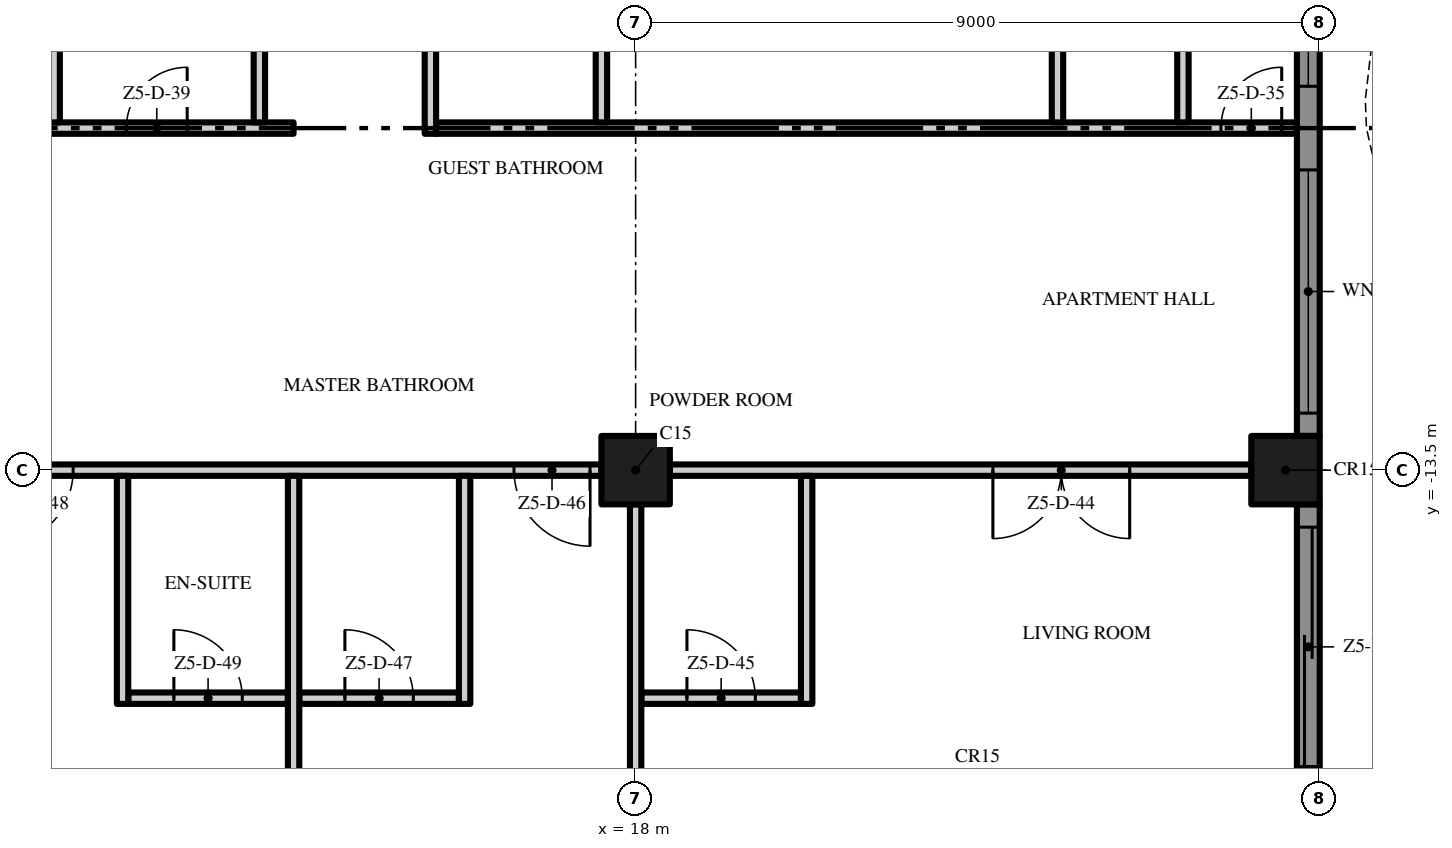
"""IFC4 building model, lengths in metres.
Left out: names, types, materials, properties, quantities, classifications, styles, units other than length and angle.
Written with IfcOpenShell. Run it as: python <this file> out.ifc"""

import sys

from ifc_helpers import new_model, si_unit, direction, frame, frame_2d, origin, origin_2d, place, context, subcontext, project, spatial, polyline, rectangle, outline, extrude, element, fill, save


model = new_model("IFC4")
c1 = context("Model", 3, precision=1e-05, world=origin(), true_north=direction((0.0, 1.0)))
c2 = subcontext(c1, "Body", "Model", "MODEL_VIEW")
j1 = project(units=[si_unit("LENGTHUNIT", "METRE"), si_unit("PLANEANGLEUNIT", "RADIAN")], contexts=[c1])
p1 = place(None, origin())
s1 = spatial("IfcSite", under=j1, at=p1, CompositionType="ELEMENT")
p2 = place(p1, origin())
s2 = spatial("IfcBuilding", under=s1, at=p2, CompositionType="ELEMENT")
p3 = place(p2, frame((0.0, 0.0, 276.8)))
s3 = spatial("IfcBuildingStorey", under=s2, at=p3, CompositionType="ELEMENT", Elevation=276.8)
for number, where, z_axis, x_axis in (
    (1, (18.0, -13.5, 0.0), (0.0, 0.0, 1.0), (1.0, 0.0, 0.0)),
    (2, (26.55, -13.5, 0.0), (0.0, 0.0, 1.0), (1.0, 0.0, 0.0)),
):
    element("IfcColumn", number, at=place(p3, frame(where, z_axis=z_axis, x_axis=x_axis)), inside=s3, PredefinedType="COLUMN", context=c2, shape_type="SweptSolid", body=[
        extrude(rectangle(XDim=0.9, YDim=0.9, at=origin_2d()), origin(), (0.0, 0.0, 1.0), 3.5),
    ])
p4 = place(p3, frame((26.85, -13.95, 0.0), z_axis=(0.0, 0.0, 1.0), x_axis=(0.0, -1.0, 0.0)))
e3 = element("IfcWall", 3, at=p4, inside=s3, PredefinedType="SOLIDWALL", context=c2, shape_type="SweptSolid", body=[
    extrude(rectangle(XDim=3.75, YDim=0.3, at=frame_2d((1.875, 0.0))), origin(), (0.0, 0.0, 1.0), 3.5),
])
p5 = place(p4, frame((0.3, 0.0, 0.0)))
e4 = element("IfcOpeningElement", 4, at=p5, cuts=e3, PredefinedType="OPENING", context=c2, shape_type="SweptSolid", body=[
    extrude(rectangle(XDim=3.15, YDim=2.4, at=frame_2d((1.575, 1.2))), frame((0.0, 0.16, 0.0), z_axis=(0.0, -1.0, 0.0), x_axis=(1.0, 0.0, 0.0)), (0.0, 0.0, 1.0), 0.32),
])
p6 = place(p3, frame((26.85, -4.95, 0.0), z_axis=(0.0, 0.0, 1.0), x_axis=(0.0, -1.0, 0.0)))
e5 = element("IfcWall", 5, at=p6, inside=s3, PredefinedType="SOLIDWALL", context=c2, shape_type="SweptSolid", body=[
    extrude(rectangle(XDim=8.1, YDim=0.3, at=frame_2d((4.05, 0.0))), origin(), (0.0, 0.0, 1.0), 3.5),
])
p7 = place(p6, frame((4.6, 0.0, 0.45)))
e6 = element("IfcOpeningElement", 6, at=p7, cuts=e5, PredefinedType="OPENING", context=c2, shape_type="SweptSolid", body=[
    extrude(rectangle(XDim=3.2, YDim=2.65, at=frame_2d((1.6, 1.325))), frame((0.0, 0.16, 0.0), z_axis=(0.0, -1.0, 0.0), x_axis=(1.0, 0.0, 0.0)), (0.0, 0.0, 1.0), 0.32),
])
p8 = place(p6, frame((0.3, 0.0, 0.45)))
e7 = element("IfcOpeningElement", 7, at=p8, cuts=e5, PredefinedType="OPENING", context=c2, shape_type="SweptSolid", body=[
    extrude(rectangle(XDim=3.2, YDim=2.65, at=frame_2d((1.6, 1.325))), frame((0.0, 0.16, 0.0), z_axis=(0.0, -1.0, 0.0), x_axis=(1.0, 0.0, 0.0)), (0.0, 0.0, 1.0), 0.32),
])
p9 = place(p3, origin())
e8 = element("IfcWall", 8, at=p9, inside=s3, PredefinedType="USERDEFINED", context=c2, shape_type="SweptSolid", body=[
    extrude(outline(polyline([(29.649, -18.0), (29.985, -16.5), (30.0, -16.125), (29.869, -15.0), (29.345, -13.5), (28.612, -12.0), (27.951, -10.5), (27.615, -9.0), (27.6, -8.625), (27.731, -7.5), (28.255, -6.0), (28.988, -4.5), (29.649, -3.0), (29.985, -1.5), (30.0, -1.125), (29.869, 0.0), (29.345, 1.5), (28.612, 3.0), (27.951, 4.5), (27.615, 6.0), (27.6, 6.375), (27.731, 7.5), (28.255, 9.0), (28.988, 10.5), (29.649, 12.0), (29.985, 13.5), (30.0, 13.875), (29.869, 15.0), (29.345, 16.5), (28.612, 18.0), (28.388, 17.89), (29.114, 16.404), (29.624, 14.944), (29.749, 13.865), (29.736, 13.533), (29.41, 12.079), (28.761, 10.605), (28.024, 9.096), (27.486, 7.556), (27.349, 6.385), (27.366, 5.967), (27.713, 4.421), (28.385, 2.895), (29.114, 1.404), (29.624, -0.056), (29.749, -1.135), (29.736, -1.467), (29.41, -2.921), (28.761, -4.395), (28.024, -5.904), (27.486, -7.444), (27.349, -8.615), (27.366, -9.033), (27.713, -10.579), (28.385, -12.105), (29.114, -13.596), (29.624, -15.056), (29.749, -16.135), (29.736, -16.467), (29.405, -17.945), (29.649, -18.0)])), origin(), (0.0, 0.0, 1.0), 0.9),
])
p10 = place(p3, frame((11.325, -16.5, 0.0), z_axis=(0.0, 0.0, 1.0), x_axis=(1.0, 0.0, 0.0)))
e9 = element("IfcWall", 9, at=p10, inside=s3, PredefinedType="PARTITIONING", context=c2, shape_type="SweptSolid", body=[
    extrude(rectangle(XDim=2.1, YDim=0.15, at=frame_2d((1.05, 0.0))), origin(), (0.0, 0.0, 1.0), 3.5),
])
p11 = place(p10, frame((0.6, 0.0, 0.0)))
e10 = element("IfcOpeningElement", 10, at=p11, cuts=e9, PredefinedType="OPENING", context=c2, shape_type="SweptSolid", body=[
    extrude(rectangle(XDim=0.9, YDim=2.1, at=frame_2d((0.45, 1.05))), frame((0.0, 0.085, 0.0), z_axis=(0.0, -1.0, 0.0), x_axis=(1.0, 0.0, 0.0)), (0.0, 0.0, 1.0), 0.17),
])
p12 = place(p3, frame((13.575, -16.5, 0.0), z_axis=(0.0, 0.0, 1.0), x_axis=(1.0, 0.0, 0.0)))
e11 = element("IfcWall", 11, at=p12, inside=s3, PredefinedType="PARTITIONING", context=c2, shape_type="SweptSolid", body=[
    extrude(rectangle(XDim=2.1, YDim=0.15, at=frame_2d((1.05, 0.0))), origin(), (0.0, 0.0, 1.0), 3.5),
])
p13 = place(p12, frame((0.6, 0.0, 0.0)))
e12 = element("IfcOpeningElement", 12, at=p13, cuts=e11, PredefinedType="OPENING", context=c2, shape_type="SweptSolid", body=[
    extrude(rectangle(XDim=0.9, YDim=2.1, at=frame_2d((0.45, 1.05))), frame((0.0, 0.085, 0.0), z_axis=(0.0, -1.0, 0.0), x_axis=(1.0, 0.0, 0.0)), (0.0, 0.0, 1.0), 0.17),
])
p14 = place(p3, frame((18.075, -16.5, 0.0), z_axis=(0.0, 0.0, 1.0), x_axis=(1.0, 0.0, 0.0)))
e13 = element("IfcWall", 13, at=p14, inside=s3, PredefinedType="PARTITIONING", context=c2, shape_type="SweptSolid", body=[
    extrude(rectangle(XDim=2.1, YDim=0.15, at=frame_2d((1.05, 0.0))), origin(), (0.0, 0.0, 1.0), 3.5),
])
p15 = place(p14, frame((0.6, 0.0, 0.0)))
e14 = element("IfcOpeningElement", 14, at=p15, cuts=e13, PredefinedType="OPENING", context=c2, shape_type="SweptSolid", body=[
    extrude(rectangle(XDim=0.9, YDim=2.1, at=frame_2d((0.45, 1.05))), frame((0.0, 0.085, 0.0), z_axis=(0.0, -1.0, 0.0), x_axis=(1.0, 0.0, 0.0)), (0.0, 0.0, 1.0), 0.17),
])
p16 = place(p3, frame((17.55, -13.5, 0.0), z_axis=(0.0, 0.0, 1.0), x_axis=(-1.0, 0.0, 0.0)))
e15 = element("IfcWall", 15, at=p16, inside=s3, PredefinedType="PARTITIONING", context=c2, shape_type="SweptSolid", body=[
    extrude(rectangle(XDim=8.1, YDim=0.15, at=frame_2d((4.05, 0.0))), origin(), (0.0, 0.0, 1.0), 3.5),
])
p17 = place(p16, frame((0.15, 0.0, 0.0)))
e16 = element("IfcOpeningElement", 16, at=p17, cuts=e15, PredefinedType="OPENING", context=c2, shape_type="SweptSolid", body=[
    extrude(rectangle(XDim=1.0, YDim=2.4, at=frame_2d((0.5, 1.2))), frame((0.0, 0.085, 0.0), z_axis=(0.0, -1.0, 0.0), x_axis=(1.0, 0.0, 0.0)), (0.0, 0.0, 1.0), 0.17),
])
p18 = place(p16, frame((6.95, 0.0, 0.0)))
e17 = element("IfcOpeningElement", 17, at=p18, cuts=e15, PredefinedType="OPENING", context=c2, shape_type="SweptSolid", body=[
    extrude(rectangle(XDim=1.0, YDim=2.4, at=frame_2d((0.5, 1.2))), frame((0.0, 0.085, 0.0), z_axis=(0.0, -1.0, 0.0), x_axis=(1.0, 0.0, 0.0)), (0.0, 0.0, 1.0), 0.17),
])
p19 = place(p3, frame((26.1, -13.5, 0.0), z_axis=(0.0, 0.0, 1.0), x_axis=(-1.0, 0.0, 0.0)))
e18 = element("IfcWall", 18, at=p19, inside=s3, PredefinedType="PARTITIONING", context=c2, shape_type="SweptSolid", body=[
    extrude(rectangle(XDim=7.65, YDim=0.15, at=frame_2d((3.825, 0.0))), origin(), (0.0, 0.0, 1.0), 3.5),
])
p20 = place(p19, frame((1.6, 0.0, 0.0)))
e19 = element("IfcOpeningElement", 19, at=p20, cuts=e18, PredefinedType="OPENING", context=c2, shape_type="SweptSolid", body=[
    extrude(rectangle(XDim=1.8, YDim=2.4, at=frame_2d((0.9, 1.2))), frame((0.0, 0.085, 0.0), z_axis=(0.0, -1.0, 0.0), x_axis=(1.0, 0.0, 0.0)), (0.0, 0.0, 1.0), 0.17),
])
p21 = place(p3, frame((0.1, -9.0, 0.0), z_axis=(0.0, 0.0, 1.0), x_axis=(1.0, 0.0, 0.0)))
e20 = element("IfcWall", 20, at=p21, inside=s3, PredefinedType="PARTITIONING", context=c2, shape_type="SweptSolid", body=[
    extrude(rectangle(XDim=13.4, YDim=0.15, at=frame_2d((6.7, 0.0))), origin(), (0.0, 0.0, 1.0), 3.5),
])
p22 = place(p21, frame((11.2, 0.0, 0.0)))
e21 = element("IfcOpeningElement", 21, at=p22, cuts=e20, PredefinedType="OPENING", context=c2, shape_type="SweptSolid", body=[
    extrude(rectangle(XDim=0.8, YDim=2.0, at=frame_2d((0.4, 1.0))), frame((0.0, 0.085, 0.0), z_axis=(0.0, -1.0, 0.0), x_axis=(1.0, 0.0, 0.0)), (0.0, 0.0, 1.0), 0.17),
])
p23 = place(p21, frame((8.55, 0.0, 0.0)))
e22 = element("IfcOpeningElement", 22, at=p23, cuts=e20, PredefinedType="OPENING", context=c2, shape_type="SweptSolid", body=[
    extrude(rectangle(XDim=0.8, YDim=2.0, at=frame_2d((0.4, 1.0))), frame((0.0, 0.085, 0.0), z_axis=(0.0, -1.0, 0.0), x_axis=(1.0, 0.0, 0.0)), (0.0, 0.0, 1.0), 0.17),
])
p24 = place(p21, frame((5.8, 0.0, 0.0)))
e23 = element("IfcOpeningElement", 23, at=p24, cuts=e20, PredefinedType="OPENING", context=c2, shape_type="SweptSolid", body=[
    extrude(rectangle(XDim=0.8, YDim=2.0, at=frame_2d((0.4, 1.0))), frame((0.0, 0.085, 0.0), z_axis=(0.0, -1.0, 0.0), x_axis=(1.0, 0.0, 0.0)), (0.0, 0.0, 1.0), 0.17),
])
p25 = place(p3, frame((15.375, -9.0, 0.0), z_axis=(0.0, 0.0, 1.0), x_axis=(1.0, 0.0, 0.0)))
e24 = element("IfcWall", 24, at=p25, inside=s3, PredefinedType="PARTITIONING", context=c2, shape_type="SweptSolid", body=[
    extrude(rectangle(XDim=11.325, YDim=0.15, at=frame_2d((5.662, 0.0))), origin(), (0.0, 0.0, 1.0), 3.5),
])
p26 = place(p25, frame((10.325, 0.0, 0.0)))
e25 = element("IfcOpeningElement", 25, at=p26, cuts=e24, PredefinedType="OPENING", context=c2, shape_type="SweptSolid", body=[
    extrude(rectangle(XDim=0.8, YDim=2.0, at=frame_2d((0.4, 1.0))), frame((0.0, 0.085, 0.0), z_axis=(0.0, -1.0, 0.0), x_axis=(1.0, 0.0, 0.0)), (0.0, 0.0, 1.0), 0.17),
])
p27 = place(p3, frame((10.35, -8.925, 0.0), z_axis=(0.0, 0.0, 1.0), x_axis=(0.0, 1.0, 0.0)))
e26 = element("IfcWall", 26, at=p27, inside=s3, PredefinedType="PARTITIONING", context=c2, shape_type="SweptSolid", body=[
    extrude(rectangle(XDim=4.35, YDim=0.15, at=frame_2d((2.175, 0.0))), origin(), (0.0, 0.0, 1.0), 3.5),
])
p28 = place(p3, frame((11.25, -16.575, 0.0), z_axis=(0.0, 0.0, 1.0), x_axis=(0.0, 1.0, 0.0)))
e27 = element("IfcWall", 27, at=p28, inside=s3, PredefinedType="PARTITIONING", context=c2, shape_type="SweptSolid", body=[
    extrude(rectangle(XDim=3.0, YDim=0.15, at=frame_2d((1.5, 0.0))), origin(), (0.0, 0.0, 1.0), 3.5),
])
p29 = place(p3, frame((13.05, -8.925, 0.0), z_axis=(0.0, 0.0, 1.0), x_axis=(0.0, 1.0, 0.0)))
e28 = element("IfcWall", 28, at=p29, inside=s3, PredefinedType="PARTITIONING", context=c2, shape_type="SweptSolid", body=[
    extrude(rectangle(XDim=4.5, YDim=0.15, at=frame_2d((2.25, 0.0))), origin(), (0.0, 0.0, 1.0), 3.5),
])
p30 = place(p3, frame((13.5, -22.2, 0.0), z_axis=(0.0, 0.0, 1.0), x_axis=(0.0, 1.0, 0.0)))
e29 = element("IfcWall", 29, at=p30, inside=s3, PredefinedType="PARTITIONING", context=c2, shape_type="SweptSolid", body=[
    extrude(rectangle(XDim=8.625, YDim=0.15, at=frame_2d((4.312, 0.0))), origin(), (0.0, 0.0, 1.0), 3.5),
])
p31 = place(p3, frame((15.3, -4.425, 0.0), z_axis=(0.0, 0.0, 1.0), x_axis=(0.0, -1.0, 0.0)))
e30 = element("IfcWall", 30, at=p31, inside=s3, PredefinedType="PARTITIONING", context=c2, shape_type="SweptSolid", body=[
    extrude(rectangle(XDim=4.65, YDim=0.15, at=frame_2d((2.325, 0.0))), origin(), (0.0, 0.0, 1.0), 3.5),
])
p32 = place(p31, frame((1.875, 0.0, 0.0)))
e31 = element("IfcOpeningElement", 31, at=p32, cuts=e30, PredefinedType="OPENING", context=c2, shape_type="SweptSolid", body=[
    extrude(rectangle(XDim=0.9, YDim=2.1, at=frame_2d((0.45, 1.05))), frame((0.0, 0.085, 0.0), z_axis=(0.0, -1.0, 0.0), x_axis=(1.0, 0.0, 0.0)), (0.0, 0.0, 1.0), 0.17),
])
p33 = place(p3, frame((15.75, -16.575, 0.0), z_axis=(0.0, 0.0, 1.0), x_axis=(0.0, 1.0, 0.0)))
e32 = element("IfcWall", 32, at=p33, inside=s3, PredefinedType="PARTITIONING", context=c2, shape_type="SweptSolid", body=[
    extrude(rectangle(XDim=3.0, YDim=0.15, at=frame_2d((1.5, 0.0))), origin(), (0.0, 0.0, 1.0), 3.5),
])
p34 = place(p3, frame((17.55, -8.925, 0.0), z_axis=(0.0, 0.0, 1.0), x_axis=(0.0, 1.0, 0.0)))
e33 = element("IfcWall", 33, at=p34, inside=s3, PredefinedType="PARTITIONING", context=c2, shape_type="SweptSolid", body=[
    extrude(rectangle(XDim=3.975, YDim=0.15, at=frame_2d((1.988, 0.0))), origin(), (0.0, 0.0, 1.0), 3.5),
])
p35 = place(p3, frame((18.0, -21.6, 0.0), z_axis=(0.0, 0.0, 1.0), x_axis=(0.0, 1.0, 0.0)))
e34 = element("IfcWall", 34, at=p35, inside=s3, PredefinedType="PARTITIONING", context=c2, shape_type="SweptSolid", body=[
    extrude(rectangle(XDim=7.65, YDim=0.15, at=frame_2d((3.825, 0.0))), origin(), (0.0, 0.0, 1.0), 3.5),
])
p36 = place(p3, frame((20.25, -16.575, 0.0), z_axis=(0.0, 0.0, 1.0), x_axis=(0.0, 1.0, 0.0)))
e35 = element("IfcWall", 35, at=p36, inside=s3, PredefinedType="PARTITIONING", context=c2, shape_type="SweptSolid", body=[
    extrude(rectangle(XDim=3.0, YDim=0.15, at=frame_2d((1.5, 0.0))), origin(), (0.0, 0.0, 1.0), 3.5),
])
for number, where, z_axis, x_axis in (
    (36, (23.55, -8.925, 0.0), (0.0, 0.0, 1.0), (0.0, 1.0, 0.0)),
    (37, (25.2, -8.925, 0.0), (0.0, 0.0, 1.0), (0.0, 1.0, 0.0)),
):
    element("IfcWall", number, at=place(p3, frame(where, z_axis=z_axis, x_axis=x_axis)), inside=s3, PredefinedType="PARTITIONING", context=c2, shape_type="SweptSolid", body=[
        extrude(rectangle(XDim=4.35, YDim=0.15, at=frame_2d((2.175, 0.0))), origin(), (0.0, 0.0, 1.0), 3.5),
    ])
p37 = place(p5, origin())
e38 = element("IfcDoor", 38, at=p37, inside=s3, OperationType="SINGLE_SWING_LEFT", PredefinedType="DOOR", context=c2, shape_type="SweptSolid", body=[
    extrude(rectangle(XDim=3.15, YDim=2.4, at=frame_2d((1.575, 1.2))), frame((0.0, 0.025, 0.0), z_axis=(0.0, -1.0, 0.0), x_axis=(1.0, 0.0, 0.0)), (0.0, 0.0, 1.0), 0.05),
])
fill(e4, e38)
p38 = place(p7, origin())
e39 = element("IfcWindow", 39, at=p38, inside=s3, PartitioningType="SINGLE_PANEL", PredefinedType="WINDOW", context=c2, shape_type="SweptSolid", body=[
    extrude(rectangle(XDim=3.2, YDim=2.65, at=frame_2d((1.6, 1.325))), frame((0.0, 0.03, 0.0), z_axis=(0.0, -1.0, 0.0), x_axis=(1.0, 0.0, 0.0)), (0.0, 0.0, 1.0), 0.06),
])
fill(e6, e39)
p39 = place(p8, origin())
e40 = element("IfcWindow", 40, at=p39, inside=s3, PartitioningType="SINGLE_PANEL", PredefinedType="WINDOW", context=c2, shape_type="SweptSolid", body=[
    extrude(rectangle(XDim=3.2, YDim=2.65, at=frame_2d((1.6, 1.325))), frame((0.0, 0.03, 0.0), z_axis=(0.0, -1.0, 0.0), x_axis=(1.0, 0.0, 0.0)), (0.0, 0.0, 1.0), 0.06),
])
fill(e7, e40)
p40 = place(p26, origin())
e41 = element("IfcDoor", 41, at=p40, inside=s3, OperationType="SINGLE_SWING_RIGHT", PredefinedType="DOOR", context=c2, shape_type="SweptSolid", body=[
    extrude(rectangle(XDim=0.8, YDim=2.0, at=frame_2d((0.4, 1.0))), frame((0.0, 0.025, 0.0), z_axis=(0.0, -1.0, 0.0), x_axis=(1.0, 0.0, 0.0)), (0.0, 0.0, 1.0), 0.05),
])
fill(e25, e41)
p41 = place(p22, origin())
e42 = element("IfcDoor", 42, at=p41, inside=s3, OperationType="SINGLE_SWING_RIGHT", PredefinedType="DOOR", context=c2, shape_type="SweptSolid", body=[
    extrude(rectangle(XDim=0.8, YDim=2.0, at=frame_2d((0.4, 1.0))), frame((0.0, 0.025, 0.0), z_axis=(0.0, -1.0, 0.0), x_axis=(1.0, 0.0, 0.0)), (0.0, 0.0, 1.0), 0.05),
])
fill(e21, e42)
p42 = place(p20, origin())
e43 = element("IfcDoor", 43, at=p42, inside=s3, OperationType="DOUBLE_DOOR_SINGLE_SWING", PredefinedType="DOOR", context=c2, shape_type="SweptSolid", body=[
    extrude(rectangle(XDim=1.8, YDim=2.4, at=frame_2d((0.9, 1.2))), frame((0.0, 0.025, 0.0), z_axis=(0.0, -1.0, 0.0), x_axis=(1.0, 0.0, 0.0)), (0.0, 0.0, 1.0), 0.05),
])
fill(e19, e43)
p43 = place(p15, origin())
e44 = element("IfcDoor", 44, at=p43, inside=s3, OperationType="SINGLE_SWING_LEFT", PredefinedType="DOOR", context=c2, shape_type="SweptSolid", body=[
    extrude(rectangle(XDim=0.9, YDim=2.1, at=frame_2d((0.45, 1.05))), frame((0.0, 0.025, 0.0), z_axis=(0.0, -1.0, 0.0), x_axis=(1.0, 0.0, 0.0)), (0.0, 0.0, 1.0), 0.05),
])
fill(e14, e44)
p44 = place(p17, origin())
e45 = element("IfcDoor", 45, at=p44, inside=s3, OperationType="SINGLE_SWING_LEFT", PredefinedType="DOOR", context=c2, shape_type="SweptSolid", body=[
    extrude(rectangle(XDim=1.0, YDim=2.4, at=frame_2d((0.5, 1.2))), frame((0.0, 0.025, 0.0), z_axis=(0.0, -1.0, 0.0), x_axis=(1.0, 0.0, 0.0)), (0.0, 0.0, 1.0), 0.05),
])
fill(e16, e45)
p45 = place(p13, origin())
e46 = element("IfcDoor", 46, at=p45, inside=s3, OperationType="SINGLE_SWING_LEFT", PredefinedType="DOOR", context=c2, shape_type="SweptSolid", body=[
    extrude(rectangle(XDim=0.9, YDim=2.1, at=frame_2d((0.45, 1.05))), frame((0.0, 0.025, 0.0), z_axis=(0.0, -1.0, 0.0), x_axis=(1.0, 0.0, 0.0)), (0.0, 0.0, 1.0), 0.05),
])
fill(e12, e46)
p46 = place(p18, origin())
e47 = element("IfcDoor", 47, at=p46, inside=s3, OperationType="SINGLE_SWING_RIGHT", PredefinedType="DOOR", context=c2, shape_type="SweptSolid", body=[
    extrude(rectangle(XDim=1.0, YDim=2.4, at=frame_2d((0.5, 1.2))), frame((0.0, 0.025, 0.0), z_axis=(0.0, -1.0, 0.0), x_axis=(1.0, 0.0, 0.0)), (0.0, 0.0, 1.0), 0.05),
])
fill(e17, e47)
p47 = place(p11, origin())
e48 = element("IfcDoor", 48, at=p47, inside=s3, OperationType="SINGLE_SWING_LEFT", PredefinedType="DOOR", context=c2, shape_type="SweptSolid", body=[
    extrude(rectangle(XDim=0.9, YDim=2.1, at=frame_2d((0.45, 1.05))), frame((0.0, 0.025, 0.0), z_axis=(0.0, -1.0, 0.0), x_axis=(1.0, 0.0, 0.0)), (0.0, 0.0, 1.0), 0.05),
])
fill(e10, e48)
save(model, sys.argv[1])
